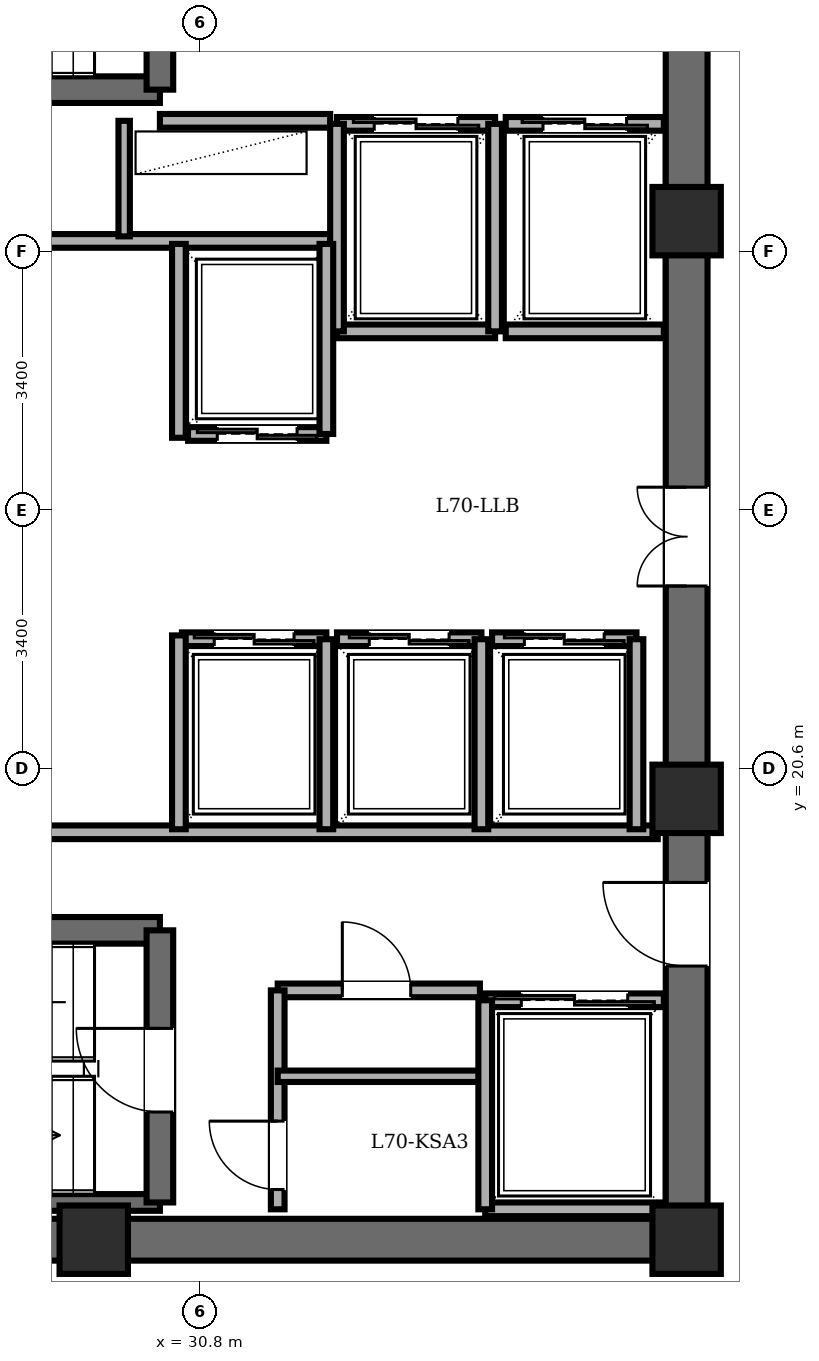
"""IFC4 building model, lengths in metres.
Left out: names, types, materials, properties, quantities, classifications, styles, units other than length and angle.
Written with IfcOpenShell. Run it as: python <this file> out.ifc"""

import sys

from ifc_helpers import new_model, si_unit, direction, frame, frame_2d, origin, origin_2d, place, context, subcontext, project, spatial, rectangle, extrude, element, fill, save


model = new_model("IFC4")
c1 = context("Model", 3, precision=1e-05, world=origin(), true_north=direction((0.0, 1.0)))
c2 = subcontext(c1, "Body", "Model", "MODEL_VIEW")
j1 = project(units=[si_unit("LENGTHUNIT", "METRE"), si_unit("PLANEANGLEUNIT", "RADIAN")], contexts=[c1])
p1 = place(None, origin())
s1 = spatial("IfcSite", under=j1, at=p1, CompositionType="ELEMENT")
p2 = place(p1, origin())
s2 = spatial("IfcBuilding", under=s1, at=p2, CompositionType="ELEMENT")
p3 = place(p2, frame((0.0, 0.0, 269.75)))
s3 = spatial("IfcBuildingStorey", under=s2, at=p3, CompositionType="ELEMENT", Elevation=269.75)
for number, where, z_axis, x_axis in (
    (1, (29.4, 14.4, 0.0), (0.0, 0.0, 1.0), (1.0, 0.0, 0.0)),
    (2, (37.2, 14.4, 0.0), (0.0, 0.0, 1.0), (1.0, 0.0, 0.0)),
    (3, (37.2, 20.2, 0.0), (0.0, 0.0, 1.0), (1.0, 0.0, 0.0)),
    (4, (37.2, 27.8, 0.0), (0.0, 0.0, 1.0), (1.0, 0.0, 0.0)),
):
    element("IfcColumn", number, at=place(p3, frame(where, z_axis=z_axis, x_axis=x_axis)), inside=s3, PredefinedType="COLUMN", context=c2, shape_type="SweptSolid", body=[
        extrude(rectangle(XDim=0.9, YDim=0.9, at=origin_2d()), origin(), (0.0, 0.0, 1.0), 3.65),
    ])
p4 = place(p3, frame((37.2, 14.4, 0.0), z_axis=(0.0, 0.0, 1.0), x_axis=(-1.0, 0.0, 0.0)))
e5 = element("IfcWall", 5, at=p4, inside=s3, PredefinedType="SHEAR", context=c2, shape_type="SweptSolid", body=[
    extrude(rectangle(XDim=15.6, YDim=0.55, at=frame_2d((7.8, 0.0))), origin(), (0.0, 0.0, 1.0), 3.45),
])
p5 = place(p3, frame((37.2, 14.4, 0.0), z_axis=(0.0, 0.0, 1.0), x_axis=(0.0, 1.0, 0.0)))
e6 = element("IfcWall", 6, at=p5, inside=s3, PredefinedType="SHEAR", context=c2, shape_type="SweptSolid", body=[
    extrude(rectangle(XDim=19.2, YDim=0.55, at=frame_2d((9.6, 0.0))), origin(), (0.0, 0.0, 1.0), 3.45),
])
p6 = place(p5, frame((15.8, 0.0, 0.0)))
e7 = element("IfcOpeningElement", 7, at=p6, cuts=e6, PredefinedType="OPENING", context=c2, shape_type="SweptSolid", body=[
    extrude(rectangle(XDim=1.15, YDim=2.15, at=frame_2d((0.575, 1.075))), frame((0.0, 0.285, 0.0), z_axis=(0.0, -1.0, 0.0), x_axis=(1.0, 0.0, 0.0)), (0.0, 0.0, 1.0), 0.57),
])
p7 = place(p5, frame((3.6, 0.0, 0.0)))
e8 = element("IfcOpeningElement", 8, at=p7, cuts=e6, PredefinedType="OPENING", context=c2, shape_type="SweptSolid", body=[
    extrude(rectangle(XDim=1.1, YDim=2.15, at=frame_2d((0.55, 1.075))), frame((0.0, 0.285, 0.0), z_axis=(0.0, -1.0, 0.0), x_axis=(1.0, 0.0, 0.0)), (0.0, 0.0, 1.0), 0.57),
])
p8 = place(p5, frame((8.6, 0.0, 0.0)))
e9 = element("IfcOpeningElement", 9, at=p8, cuts=e6, PredefinedType="OPENING", context=c2, shape_type="SweptSolid", body=[
    extrude(rectangle(XDim=1.3, YDim=2.2, at=frame_2d((0.65, 1.1))), frame((0.0, 0.285, 0.0), z_axis=(0.0, -1.0, 0.0), x_axis=(1.0, 0.0, 0.0)), (0.0, 0.0, 1.0), 0.57),
])
p9 = place(p3, frame((22.48, 29.53, 0.0), z_axis=(0.0, 0.0, 1.0), x_axis=(1.0, 0.0, 0.0)))
e10 = element("IfcWall", 10, at=p9, inside=s3, PredefinedType="SOLIDWALL", context=c2, shape_type="SweptSolid", body=[
    extrude(rectangle(XDim=7.79, YDim=0.35, at=frame_2d((3.895, 0.0))), origin(), (0.0, 0.0, 1.0), 3.45),
])
p10 = place(p3, frame((30.27, 29.53, 0.0), z_axis=(0.0, 0.0, 1.0), x_axis=(0.0, 1.0, 0.0)))
e11 = element("IfcWall", 11, at=p10, inside=s3, PredefinedType="SOLIDWALL", context=c2, shape_type="SweptSolid", body=[
    extrude(rectangle(XDim=3.58, YDim=0.35, at=frame_2d((1.79, 0.0))), origin(), (0.0, 0.0, 1.0), 3.45),
])
p11 = place(p10, frame((1.25, 0.0, 0.0)))
e12 = element("IfcOpeningElement", 12, at=p11, cuts=e11, PredefinedType="OPENING", context=c2, shape_type="SweptSolid", body=[
    extrude(rectangle(XDim=1.1, YDim=2.15, at=frame_2d((0.55, 1.075))), frame((0.0, 0.185, 0.0), z_axis=(0.0, -1.0, 0.0), x_axis=(1.0, 0.0, 0.0)), (0.0, 0.0, 1.0), 0.37),
])
p12 = place(p3, frame((22.48, 18.47, 0.0), z_axis=(0.0, 0.0, 1.0), x_axis=(1.0, 0.0, 0.0)))
e13 = element("IfcWall", 13, at=p12, inside=s3, PredefinedType="SOLIDWALL", context=c2, shape_type="SweptSolid", body=[
    extrude(rectangle(XDim=7.79, YDim=0.35, at=frame_2d((3.895, 0.0))), origin(), (0.0, 0.0, 1.0), 3.45),
])
p13 = place(p3, frame((22.48, 14.89, 0.0), z_axis=(0.0, 0.0, 1.0), x_axis=(1.0, 0.0, 0.0)))
e14 = element("IfcWall", 14, at=p13, inside=s3, PredefinedType="PARTITIONING", context=c2, shape_type="SweptSolid", body=[
    extrude(rectangle(XDim=7.79, YDim=0.22, at=frame_2d((3.895, 0.0))), origin(), (0.0, 0.0, 1.0), 3.45),
])
p14 = place(p3, frame((30.27, 14.89, 0.0), z_axis=(0.0, 0.0, 1.0), x_axis=(0.0, 1.0, 0.0)))
e15 = element("IfcWall", 15, at=p14, inside=s3, PredefinedType="SOLIDWALL", context=c2, shape_type="SweptSolid", body=[
    extrude(rectangle(XDim=3.58, YDim=0.35, at=frame_2d((1.79, 0.0))), origin(), (0.0, 0.0, 1.0), 3.45),
])
p15 = place(p14, frame((1.19, 0.0, 0.0)))
e16 = element("IfcOpeningElement", 16, at=p15, cuts=e15, PredefinedType="OPENING", context=c2, shape_type="SweptSolid", body=[
    extrude(rectangle(XDim=1.1, YDim=2.15, at=frame_2d((0.55, 1.075))), frame((0.0, 0.185, 0.0), z_axis=(0.0, -1.0, 0.0), x_axis=(1.0, 0.0, 0.0)), (0.0, 0.0, 1.0), 0.37),
])
p16 = place(p3, frame((30.27, 29.12, 0.0), z_axis=(0.0, 0.0, 1.0), x_axis=(1.0, 0.0, 0.0)))
e17 = element("IfcWall", 17, at=p16, inside=s3, PredefinedType="PARTITIONING", context=c2, shape_type="SweptSolid", body=[
    extrude(rectangle(XDim=2.24, YDim=0.18, at=frame_2d((1.12, 0.0))), origin(), (0.0, 0.0, 1.0), 3.45),
])
p17 = place(p3, frame((21.95, 27.54, 0.0), z_axis=(0.0, 0.0, 1.0), x_axis=(1.0, 0.0, 0.0)))
e18 = element("IfcWall", 18, at=p17, inside=s3, PredefinedType="PARTITIONING", context=c2, shape_type="SweptSolid", body=[
    extrude(rectangle(XDim=10.56, YDim=0.18, at=frame_2d((5.28, 0.0))), origin(), (0.0, 0.0, 1.0), 3.45),
])
p18 = place(p3, frame((29.8, 27.6, 0.0), z_axis=(0.0, 0.0, 1.0), x_axis=(0.0, 1.0, 0.0)))
e19 = element("IfcWall", 19, at=p18, inside=s3, PredefinedType="PARTITIONING", context=c2, shape_type="SweptSolid", body=[
    extrude(rectangle(XDim=1.52, YDim=0.15, at=frame_2d((0.76, 0.0))), origin(), (0.0, 0.0, 1.0), 3.45),
])
p19 = place(p3, frame((21.95, 19.76, 0.0), z_axis=(0.0, 0.0, 1.0), x_axis=(1.0, 0.0, 0.0)))
e20 = element("IfcWall", 20, at=p19, inside=s3, PredefinedType="PARTITIONING", context=c2, shape_type="SweptSolid", body=[
    extrude(rectangle(XDim=14.87, YDim=0.18, at=frame_2d((7.435, 0.0))), origin(), (0.0, 0.0, 1.0), 3.45),
])
p20 = place(p3, frame((31.82, 17.68, 0.0), z_axis=(0.0, 0.0, 1.0), x_axis=(1.0, 0.0, 0.0)))
e21 = element("IfcWall", 21, at=p20, inside=s3, PredefinedType="PARTITIONING", context=c2, shape_type="SweptSolid", body=[
    extrude(rectangle(XDim=2.66, YDim=0.18, at=frame_2d((1.33, 0.0))), origin(), (0.0, 0.0, 1.0), 3.45),
])
p21 = place(p20, frame((0.85, 0.0, 0.0)))
e22 = element("IfcOpeningElement", 22, at=p21, cuts=e21, PredefinedType="OPENING", context=c2, shape_type="SweptSolid", body=[
    extrude(rectangle(XDim=0.9, YDim=2.05, at=frame_2d((0.45, 1.025))), frame((0.0, 0.1, 0.0), z_axis=(0.0, -1.0, 0.0), x_axis=(1.0, 0.0, 0.0)), (0.0, 0.0, 1.0), 0.2),
])
p22 = place(p3, frame((31.82, 14.8, 0.0), z_axis=(0.0, 0.0, 1.0), x_axis=(0.0, 1.0, 0.0)))
e23 = element("IfcWall", 23, at=p22, inside=s3, PredefinedType="PARTITIONING", context=c2, shape_type="SweptSolid", body=[
    extrude(rectangle(XDim=2.88, YDim=0.18, at=frame_2d((1.44, 0.0))), origin(), (0.0, 0.0, 1.0), 3.45),
])
p23 = place(p22, frame((0.26, 0.0, 0.0)))
e24 = element("IfcOpeningElement", 24, at=p23, cuts=e23, PredefinedType="OPENING", context=c2, shape_type="SweptSolid", body=[
    extrude(rectangle(XDim=0.9, YDim=2.05, at=frame_2d((0.45, 1.025))), frame((0.0, 0.1, 0.0), z_axis=(0.0, -1.0, 0.0), x_axis=(1.0, 0.0, 0.0)), (0.0, 0.0, 1.0), 0.2),
])
p24 = place(p3, frame((31.82, 16.55, 0.0), z_axis=(0.0, 0.0, 1.0), x_axis=(1.0, 0.0, 0.0)))
e25 = element("IfcWall", 25, at=p24, inside=s3, PredefinedType="PARTITIONING", context=c2, shape_type="SweptSolid", body=[
    extrude(rectangle(XDim=2.66, YDim=0.15, at=frame_2d((1.33, 0.0))), origin(), (0.0, 0.0, 1.0), 3.45),
])
p25 = place(p3, frame((32.6, 29.08, 0.0), z_axis=(0.0, 0.0, 1.0), x_axis=(1.0, 0.0, 0.0)))
e26 = element("IfcWall", 26, at=p25, inside=s3, PredefinedType="PARTITIONING", context=c2, shape_type="SweptSolid", body=[
    extrude(rectangle(XDim=2.08, YDim=0.18, at=frame_2d((1.04, 0.0))), origin(), (0.0, 0.0, 1.0), 3.45),
])
p26 = place(p25, frame((0.49, 0.0, 0.0)))
e27 = element("IfcOpeningElement", 27, at=p26, cuts=e26, PredefinedType="OPENING", context=c2, shape_type="SweptSolid", body=[
    extrude(rectangle(XDim=1.1, YDim=2.2, at=frame_2d((0.55, 1.1))), frame((0.0, 0.1, 0.0), z_axis=(0.0, -1.0, 0.0), x_axis=(1.0, 0.0, 0.0)), (0.0, 0.0, 1.0), 0.2),
])
p27 = place(p3, frame((34.68, 26.35, 0.0), z_axis=(0.0, 0.0, 1.0), x_axis=(-1.0, 0.0, 0.0)))
e28 = element("IfcWall", 28, at=p27, inside=s3, PredefinedType="PARTITIONING", context=c2, shape_type="SweptSolid", body=[
    extrude(rectangle(XDim=2.08, YDim=0.18, at=frame_2d((1.04, 0.0))), origin(), (0.0, 0.0, 1.0), 3.45),
])
for number, where, z_axis, x_axis in (
    (29, (34.68, 26.35, 0.0), (0.0, 0.0, 1.0), (0.0, 1.0, 0.0)),
    (30, (32.6, 29.08, 0.0), (0.0, 0.0, 1.0), (0.0, -1.0, 0.0)),
):
    element("IfcWall", number, at=place(p3, frame(where, z_axis=z_axis, x_axis=x_axis)), inside=s3, PredefinedType="PARTITIONING", context=c2, shape_type="SweptSolid", body=[
        extrude(rectangle(XDim=2.73, YDim=0.18, at=frame_2d((1.365, 0.0))), origin(), (0.0, 0.0, 1.0), 3.45),
    ])
p28 = place(p3, frame((34.82, 29.08, 0.0), z_axis=(0.0, 0.0, 1.0), x_axis=(1.0, 0.0, 0.0)))
e31 = element("IfcWall", 31, at=p28, inside=s3, PredefinedType="PARTITIONING", context=c2, shape_type="SweptSolid", body=[
    extrude(rectangle(XDim=2.08, YDim=0.18, at=frame_2d((1.04, 0.0))), origin(), (0.0, 0.0, 1.0), 3.45),
])
p29 = place(p28, frame((0.49, 0.0, 0.0)))
e32 = element("IfcOpeningElement", 32, at=p29, cuts=e31, PredefinedType="OPENING", context=c2, shape_type="SweptSolid", body=[
    extrude(rectangle(XDim=1.1, YDim=2.2, at=frame_2d((0.55, 1.1))), frame((0.0, 0.1, 0.0), z_axis=(0.0, -1.0, 0.0), x_axis=(1.0, 0.0, 0.0)), (0.0, 0.0, 1.0), 0.2),
])
p30 = place(p3, frame((36.9, 26.35, 0.0), z_axis=(0.0, 0.0, 1.0), x_axis=(-1.0, 0.0, 0.0)))
e33 = element("IfcWall", 33, at=p30, inside=s3, PredefinedType="PARTITIONING", context=c2, shape_type="SweptSolid", body=[
    extrude(rectangle(XDim=2.08, YDim=0.18, at=frame_2d((1.04, 0.0))), origin(), (0.0, 0.0, 1.0), 3.45),
])
p31 = place(p3, frame((34.55, 17.55, 0.0), z_axis=(0.0, 0.0, 1.0), x_axis=(1.0, 0.0, 0.0)))
e34 = element("IfcWall", 34, at=p31, inside=s3, PredefinedType="PARTITIONING", context=c2, shape_type="SweptSolid", body=[
    extrude(rectangle(XDim=2.35, YDim=0.18, at=frame_2d((1.175, 0.0))), origin(), (0.0, 0.0, 1.0), 3.45),
])
p32 = place(p31, frame((0.475, 0.0, 0.0)))
e35 = element("IfcOpeningElement", 35, at=p32, cuts=e34, PredefinedType="OPENING", context=c2, shape_type="SweptSolid", body=[
    extrude(rectangle(XDim=1.4, YDim=2.3, at=frame_2d((0.7, 1.15))), frame((0.0, 0.1, 0.0), z_axis=(0.0, -1.0, 0.0), x_axis=(1.0, 0.0, 0.0)), (0.0, 0.0, 1.0), 0.2),
])
p33 = place(p3, frame((36.9, 14.8, 0.0), z_axis=(0.0, 0.0, 1.0), x_axis=(-1.0, 0.0, 0.0)))
e36 = element("IfcWall", 36, at=p33, inside=s3, PredefinedType="PARTITIONING", context=c2, shape_type="SweptSolid", body=[
    extrude(rectangle(XDim=2.35, YDim=0.18, at=frame_2d((1.175, 0.0))), origin(), (0.0, 0.0, 1.0), 3.45),
])
p34 = place(p3, frame((34.55, 17.55, 0.0), z_axis=(0.0, 0.0, 1.0), x_axis=(0.0, -1.0, 0.0)))
e37 = element("IfcWall", 37, at=p34, inside=s3, PredefinedType="PARTITIONING", context=c2, shape_type="SweptSolid", body=[
    extrude(rectangle(XDim=2.75, YDim=0.18, at=frame_2d((1.375, 0.0))), origin(), (0.0, 0.0, 1.0), 3.45),
])
p35 = place(p3, frame((32.46, 25.0, 0.0), z_axis=(0.0, 0.0, 1.0), x_axis=(-1.0, 0.0, 0.0)))
e38 = element("IfcWall", 38, at=p35, inside=s3, PredefinedType="PARTITIONING", context=c2, shape_type="SweptSolid", body=[
    extrude(rectangle(XDim=1.82, YDim=0.18, at=frame_2d((0.91, 0.0))), origin(), (0.0, 0.0, 1.0), 3.45),
])
p36 = place(p35, frame((0.385, 0.0, 0.0)))
e39 = element("IfcOpeningElement", 39, at=p36, cuts=e38, PredefinedType="OPENING", context=c2, shape_type="SweptSolid", body=[
    extrude(rectangle(XDim=1.05, YDim=2.2, at=frame_2d((0.525, 1.1))), frame((0.0, 0.1, 0.0), z_axis=(0.0, -1.0, 0.0), x_axis=(1.0, 0.0, 0.0)), (0.0, 0.0, 1.0), 0.2),
])
p37 = place(p3, frame((32.46, 25.0, 0.0), z_axis=(0.0, 0.0, 1.0), x_axis=(0.0, 1.0, 0.0)))
e40 = element("IfcWall", 40, at=p37, inside=s3, PredefinedType="PARTITIONING", context=c2, shape_type="SweptSolid", body=[
    extrude(rectangle(XDim=2.5, YDim=0.18, at=frame_2d((1.25, 0.0))), origin(), (0.0, 0.0, 1.0), 3.45),
])
p38 = place(p3, frame((30.56, 22.3, 0.0), z_axis=(0.0, 0.0, 1.0), x_axis=(1.0, 0.0, 0.0)))
e41 = element("IfcWall", 41, at=p38, inside=s3, PredefinedType="PARTITIONING", context=c2, shape_type="SweptSolid", body=[
    extrude(rectangle(XDim=1.9, YDim=0.18, at=frame_2d((0.95, 0.0))), origin(), (0.0, 0.0, 1.0), 3.45),
])
p39 = place(p38, frame((0.425, 0.0, 0.0)))
e42 = element("IfcOpeningElement", 42, at=p39, cuts=e41, PredefinedType="OPENING", context=c2, shape_type="SweptSolid", body=[
    extrude(rectangle(XDim=1.05, YDim=2.2, at=frame_2d((0.525, 1.1))), frame((0.0, 0.1, 0.0), z_axis=(0.0, -1.0, 0.0), x_axis=(1.0, 0.0, 0.0)), (0.0, 0.0, 1.0), 0.2),
])
p40 = place(p3, frame((32.46, 19.8, 0.0), z_axis=(0.0, 0.0, 1.0), x_axis=(0.0, 1.0, 0.0)))
e43 = element("IfcWall", 43, at=p40, inside=s3, PredefinedType="PARTITIONING", context=c2, shape_type="SweptSolid", body=[
    extrude(rectangle(XDim=2.5, YDim=0.18, at=frame_2d((1.25, 0.0))), origin(), (0.0, 0.0, 1.0), 3.45),
])
p41 = place(p3, frame((32.6, 22.3, 0.0), z_axis=(0.0, 0.0, 1.0), x_axis=(1.0, 0.0, 0.0)))
e44 = element("IfcWall", 44, at=p41, inside=s3, PredefinedType="PARTITIONING", context=c2, shape_type="SweptSolid", body=[
    extrude(rectangle(XDim=1.9, YDim=0.18, at=frame_2d((0.95, 0.0))), origin(), (0.0, 0.0, 1.0), 3.45),
])
p42 = place(p41, frame((0.425, 0.0, 0.0)))
e45 = element("IfcOpeningElement", 45, at=p42, cuts=e44, PredefinedType="OPENING", context=c2, shape_type="SweptSolid", body=[
    extrude(rectangle(XDim=1.05, YDim=2.2, at=frame_2d((0.525, 1.1))), frame((0.0, 0.1, 0.0), z_axis=(0.0, -1.0, 0.0), x_axis=(1.0, 0.0, 0.0)), (0.0, 0.0, 1.0), 0.2),
])
p43 = place(p3, frame((34.5, 19.8, 0.0), z_axis=(0.0, 0.0, 1.0), x_axis=(0.0, 1.0, 0.0)))
e46 = element("IfcWall", 46, at=p43, inside=s3, PredefinedType="PARTITIONING", context=c2, shape_type="SweptSolid", body=[
    extrude(rectangle(XDim=2.5, YDim=0.18, at=frame_2d((1.25, 0.0))), origin(), (0.0, 0.0, 1.0), 3.45),
])
p44 = place(p3, frame((34.64, 22.3, 0.0), z_axis=(0.0, 0.0, 1.0), x_axis=(1.0, 0.0, 0.0)))
e47 = element("IfcWall", 47, at=p44, inside=s3, PredefinedType="PARTITIONING", context=c2, shape_type="SweptSolid", body=[
    extrude(rectangle(XDim=1.9, YDim=0.18, at=frame_2d((0.95, 0.0))), origin(), (0.0, 0.0, 1.0), 3.45),
])
p45 = place(p44, frame((0.425, 0.0, 0.0)))
e48 = element("IfcOpeningElement", 48, at=p45, cuts=e47, PredefinedType="OPENING", context=c2, shape_type="SweptSolid", body=[
    extrude(rectangle(XDim=1.05, YDim=2.2, at=frame_2d((0.525, 1.1))), frame((0.0, 0.1, 0.0), z_axis=(0.0, -1.0, 0.0), x_axis=(1.0, 0.0, 0.0)), (0.0, 0.0, 1.0), 0.2),
])
p46 = place(p3, frame((36.54, 19.8, 0.0), z_axis=(0.0, 0.0, 1.0), x_axis=(0.0, 1.0, 0.0)))
e49 = element("IfcWall", 49, at=p46, inside=s3, PredefinedType="PARTITIONING", context=c2, shape_type="SweptSolid", body=[
    extrude(rectangle(XDim=2.5, YDim=0.18, at=frame_2d((1.25, 0.0))), origin(), (0.0, 0.0, 1.0), 3.45),
])
for number, where, z_axis, x_axis in (
    (50, (30.52, 24.95, 0.0), (0.0, 0.0, 1.0), (0.0, 1.0, 0.0)),
    (51, (30.52, 19.8, 0.0), (0.0, 0.0, 1.0), (0.0, 1.0, 0.0)),
):
    element("IfcWall", number, at=place(p3, frame(where, z_axis=z_axis, x_axis=x_axis)), inside=s3, PredefinedType="PARTITIONING", context=c2, shape_type="SweptSolid", body=[
        extrude(rectangle(XDim=2.55, YDim=0.18, at=frame_2d((1.275, 0.0))), origin(), (0.0, 0.0, 1.0), 3.45),
    ])
p47 = place(p15, origin())
e52 = element("IfcDoor", 52, at=p47, inside=s3, OperationType="SINGLE_SWING_RIGHT", PredefinedType="DOOR", context=c2, shape_type="SweptSolid", body=[
    extrude(rectangle(XDim=1.1, YDim=2.15, at=frame_2d((0.55, 1.075))), frame((0.0, 0.025, 0.0), z_axis=(0.0, -1.0, 0.0), x_axis=(1.0, 0.0, 0.0)), (0.0, 0.0, 1.0), 0.05),
])
fill(e16, e52)
p48 = place(p7, origin())
e53 = element("IfcDoor", 53, at=p48, inside=s3, OperationType="SINGLE_SWING_RIGHT", PredefinedType="DOOR", context=c2, shape_type="SweptSolid", body=[
    extrude(rectangle(XDim=1.1, YDim=2.15, at=frame_2d((0.55, 1.075))), frame((0.0, 0.025, 0.0), z_axis=(0.0, -1.0, 0.0), x_axis=(1.0, 0.0, 0.0)), (0.0, 0.0, 1.0), 0.05),
])
fill(e8, e53)
p49 = place(p21, origin())
e54 = element("IfcDoor", 54, at=p49, inside=s3, OperationType="SINGLE_SWING_LEFT", PredefinedType="DOOR", context=c2, shape_type="SweptSolid", body=[
    extrude(rectangle(XDim=0.9, YDim=2.05, at=frame_2d((0.45, 1.025))), frame((0.0, 0.025, 0.0), z_axis=(0.0, -1.0, 0.0), x_axis=(1.0, 0.0, 0.0)), (0.0, 0.0, 1.0), 0.05),
])
fill(e22, e54)
p50 = place(p23, origin())
e55 = element("IfcDoor", 55, at=p50, inside=s3, OperationType="SINGLE_SWING_RIGHT", PredefinedType="DOOR", context=c2, shape_type="SweptSolid", body=[
    extrude(rectangle(XDim=0.9, YDim=2.05, at=frame_2d((0.45, 1.025))), frame((0.0, 0.025, 0.0), z_axis=(0.0, -1.0, 0.0), x_axis=(1.0, 0.0, 0.0)), (0.0, 0.0, 1.0), 0.05),
])
fill(e24, e55)
p51 = place(p26, origin())
e56 = element("IfcDoor", 56, at=p51, inside=s3, OperationType="DOUBLE_DOOR_SLIDING", PredefinedType="DOOR", context=c2, shape_type="SweptSolid", body=[
    extrude(rectangle(XDim=1.1, YDim=2.2, at=frame_2d((0.55, 1.1))), frame((0.0, 0.025, 0.0), z_axis=(0.0, -1.0, 0.0), x_axis=(1.0, 0.0, 0.0)), (0.0, 0.0, 1.0), 0.05),
])
fill(e27, e56)
p52 = place(p29, origin())
e57 = element("IfcDoor", 57, at=p52, inside=s3, OperationType="DOUBLE_DOOR_SLIDING", PredefinedType="DOOR", context=c2, shape_type="SweptSolid", body=[
    extrude(rectangle(XDim=1.1, YDim=2.2, at=frame_2d((0.55, 1.1))), frame((0.0, 0.025, 0.0), z_axis=(0.0, -1.0, 0.0), x_axis=(1.0, 0.0, 0.0)), (0.0, 0.0, 1.0), 0.05),
])
fill(e32, e57)
p53 = place(p32, origin())
e58 = element("IfcDoor", 58, at=p53, inside=s3, OperationType="DOUBLE_DOOR_SLIDING", PredefinedType="DOOR", context=c2, shape_type="SweptSolid", body=[
    extrude(rectangle(XDim=1.4, YDim=2.3, at=frame_2d((0.7, 1.15))), frame((0.0, 0.025, 0.0), z_axis=(0.0, -1.0, 0.0), x_axis=(1.0, 0.0, 0.0)), (0.0, 0.0, 1.0), 0.05),
])
fill(e35, e58)
p54 = place(p36, origin())
e59 = element("IfcDoor", 59, at=p54, inside=s3, OperationType="DOUBLE_DOOR_SLIDING", PredefinedType="DOOR", context=c2, shape_type="SweptSolid", body=[
    extrude(rectangle(XDim=1.05, YDim=2.2, at=frame_2d((0.525, 1.1))), frame((0.0, 0.025, 0.0), z_axis=(0.0, -1.0, 0.0), x_axis=(1.0, 0.0, 0.0)), (0.0, 0.0, 1.0), 0.05),
])
fill(e39, e59)
p55 = place(p39, origin())
e60 = element("IfcDoor", 60, at=p55, inside=s3, OperationType="DOUBLE_DOOR_SLIDING", PredefinedType="DOOR", context=c2, shape_type="SweptSolid", body=[
    extrude(rectangle(XDim=1.05, YDim=2.2, at=frame_2d((0.525, 1.1))), frame((0.0, 0.025, 0.0), z_axis=(0.0, -1.0, 0.0), x_axis=(1.0, 0.0, 0.0)), (0.0, 0.0, 1.0), 0.05),
])
fill(e42, e60)
p56 = place(p42, origin())
e61 = element("IfcDoor", 61, at=p56, inside=s3, OperationType="DOUBLE_DOOR_SLIDING", PredefinedType="DOOR", context=c2, shape_type="SweptSolid", body=[
    extrude(rectangle(XDim=1.05, YDim=2.2, at=frame_2d((0.525, 1.1))), frame((0.0, 0.025, 0.0), z_axis=(0.0, -1.0, 0.0), x_axis=(1.0, 0.0, 0.0)), (0.0, 0.0, 1.0), 0.05),
])
fill(e45, e61)
p57 = place(p45, origin())
e62 = element("IfcDoor", 62, at=p57, inside=s3, OperationType="DOUBLE_DOOR_SLIDING", PredefinedType="DOOR", context=c2, shape_type="SweptSolid", body=[
    extrude(rectangle(XDim=1.05, YDim=2.2, at=frame_2d((0.525, 1.1))), frame((0.0, 0.025, 0.0), z_axis=(0.0, -1.0, 0.0), x_axis=(1.0, 0.0, 0.0)), (0.0, 0.0, 1.0), 0.05),
])
fill(e48, e62)
p58 = place(p8, origin())
e63 = element("IfcDoor", 63, at=p58, inside=s3, OperationType="DOUBLE_DOOR_SINGLE_SWING", PredefinedType="DOOR", context=c2, shape_type="SweptSolid", body=[
    extrude(rectangle(XDim=1.3, YDim=2.2, at=frame_2d((0.65, 1.1))), frame((0.0, 0.025, 0.0), z_axis=(0.0, -1.0, 0.0), x_axis=(1.0, 0.0, 0.0)), (0.0, 0.0, 1.0), 0.05),
])
fill(e9, e63)
save(model, sys.argv[1])
